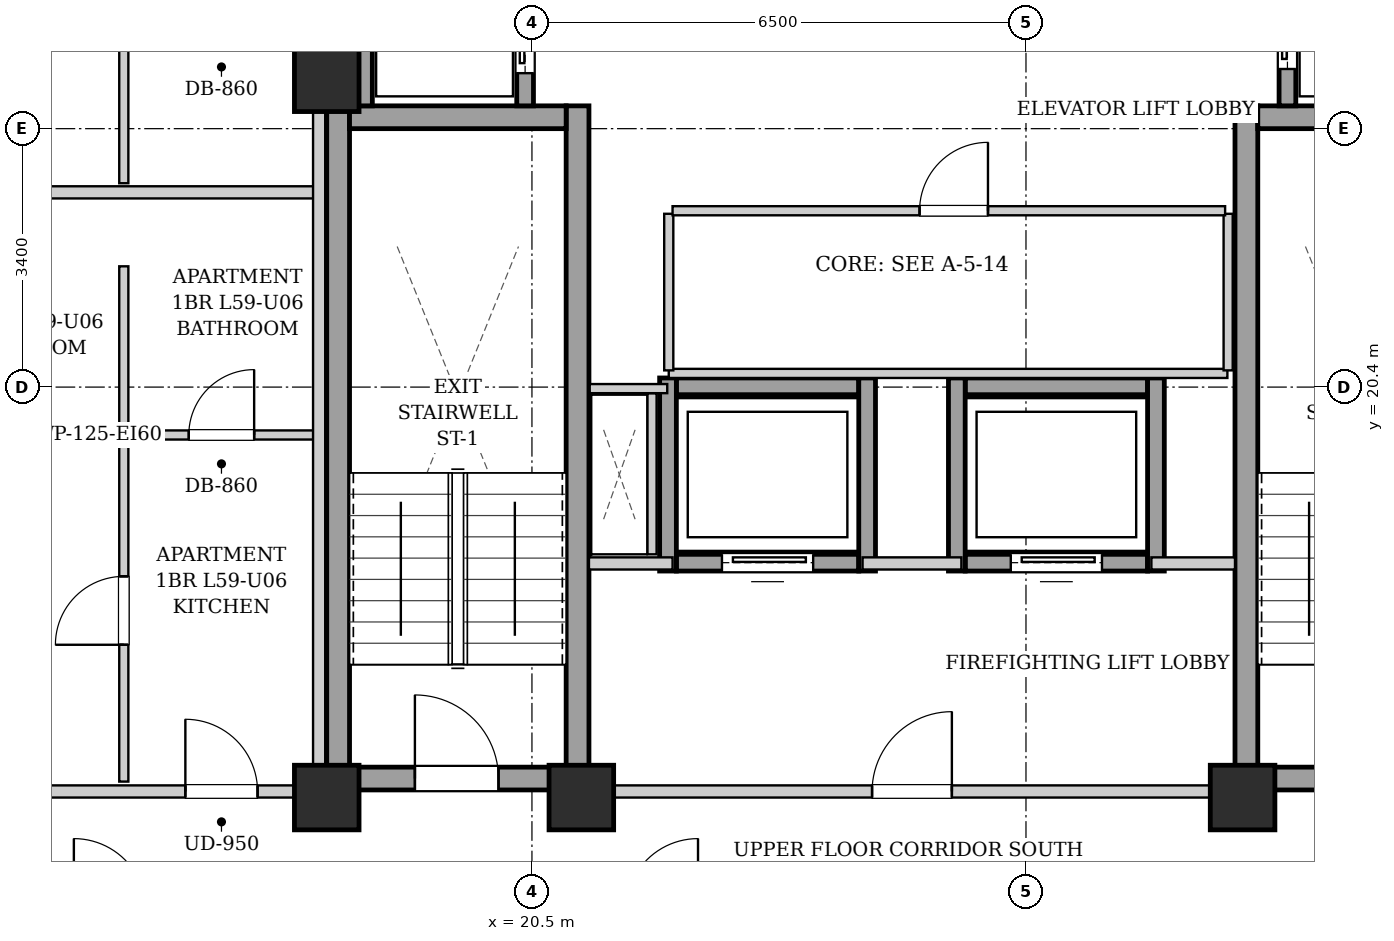
"""IFC4 building model, lengths in metres.
Left out: names, types, materials, properties, quantities, classifications, styles, units other than length and angle.
Written with IfcOpenShell. Run it as: python <this file> out.ifc"""

import sys

from ifc_helpers import new_model, si_unit, direction, frame, frame_2d, origin, origin_2d, place, context, subcontext, project, spatial, rectangle, extrude, element, fill, save


model = new_model("IFC4")
c1 = context("Model", 3, precision=1e-05, world=origin(), true_north=direction((0.0, 1.0)))
c2 = subcontext(c1, "Body", "Model", "MODEL_VIEW")
j1 = project(units=[si_unit("LENGTHUNIT", "METRE"), si_unit("PLANEANGLEUNIT", "RADIAN")], contexts=[c1])
p1 = place(None, origin())
s1 = spatial("IfcSite", under=j1, at=p1, CompositionType="ELEMENT")
p2 = place(p1, origin())
s2 = spatial("IfcBuilding", under=s1, at=p2, CompositionType="ELEMENT")
p3 = place(p2, frame((0.0, 0.0, 204.1)))
s3 = spatial("IfcBuildingStorey", under=s2, at=p3, CompositionType="ELEMENT", Elevation=204.1)
for number, where, z_axis, x_axis in (
    (1, (17.8, 15.0, 0.0), (0.0, 0.0, 1.0), (1.0, 0.0, 0.0)),
    (2, (21.15, 15.0, 0.0), (0.0, 0.0, 1.0), (1.0, 0.0, 0.0)),
    (3, (29.85, 15.0, 0.0), (0.0, 0.0, 1.0), (1.0, 0.0, 0.0)),
    (4, (17.8, 24.45, 0.0), (0.0, 0.0, 1.0), (1.0, 0.0, 0.0)),
):
    element("IfcColumn", number, at=place(p3, frame(where, z_axis=z_axis, x_axis=x_axis)), inside=s3, PredefinedType="COLUMN", context=c2, shape_type="SweptSolid", body=[
        extrude(rectangle(XDim=0.85, YDim=0.85, at=origin_2d()), origin(), (0.0, 0.0, 1.0), 3.3),
    ])
for number, where, z_axis, x_axis in (
    (5, (17.95, 15.1, 0.0), (0.0, 0.0, 1.0), (0.0, 1.0, 0.0)),
    (6, (21.1, 15.1, 0.0), (0.0, 0.0, 1.0), (0.0, 1.0, 0.0)),
):
    element("IfcWall", number, at=place(p3, frame(where, z_axis=z_axis, x_axis=x_axis)), inside=s3, PredefinedType="SHEAR", context=c2, shape_type="SweptSolid", body=[
        extrude(rectangle(XDim=9.0, YDim=0.3, at=frame_2d((4.5, 0.0))), origin(), (0.0, 0.0, 1.0), 3.04),
    ])
p4 = place(p3, frame((18.1, 23.95, 0.0), z_axis=(0.0, 0.0, 1.0), x_axis=(1.0, 0.0, 0.0)))
e7 = element("IfcWall", 7, at=p4, inside=s3, PredefinedType="SHEAR", context=c2, shape_type="SweptSolid", body=[
    extrude(rectangle(XDim=2.85, YDim=0.3, at=frame_2d((1.425, 0.0))), origin(), (0.0, 0.0, 1.0), 3.04),
])
p5 = place(p3, frame((18.1, 15.25, 0.0), z_axis=(0.0, 0.0, 1.0), x_axis=(1.0, 0.0, 0.0)))
e8 = element("IfcWall", 8, at=p5, inside=s3, PredefinedType="SHEAR", context=c2, shape_type="SweptSolid", body=[
    extrude(rectangle(XDim=2.85, YDim=0.3, at=frame_2d((1.425, 0.0))), origin(), (0.0, 0.0, 1.0), 3.04),
])
p6 = place(p5, frame((0.86, 0.0, 0.0)))
e9 = element("IfcOpeningElement", 9, at=p6, cuts=e8, PredefinedType="OPENING", context=c2, shape_type="SweptSolid", body=[
    extrude(rectangle(XDim=1.1, YDim=2.05, at=frame_2d((0.55, 1.025))), frame((0.0, 0.16, 0.0), z_axis=(0.0, -1.0, 0.0), x_axis=(1.0, 0.0, 0.0)), (0.0, 0.0, 1.0), 0.32),
])
p7 = place(p3, frame((29.9, 15.1, 0.0), z_axis=(0.0, 0.0, 1.0), x_axis=(0.0, 1.0, 0.0)))
e10 = element("IfcWall", 10, at=p7, inside=s3, PredefinedType="SHEAR", context=c2, shape_type="SweptSolid", body=[
    extrude(rectangle(XDim=9.0, YDim=0.3, at=frame_2d((4.5, 0.0))), origin(), (0.0, 0.0, 1.0), 3.04),
])
p8 = place(p3, frame((30.05, 23.95, 0.0), z_axis=(0.0, 0.0, 1.0), x_axis=(1.0, 0.0, 0.0)))
e11 = element("IfcWall", 11, at=p8, inside=s3, PredefinedType="SHEAR", context=c2, shape_type="SweptSolid", body=[
    extrude(rectangle(XDim=2.85, YDim=0.3, at=frame_2d((1.425, 0.0))), origin(), (0.0, 0.0, 1.0), 3.04),
])
p9 = place(p3, frame((30.05, 15.25, 0.0), z_axis=(0.0, 0.0, 1.0), x_axis=(1.0, 0.0, 0.0)))
e12 = element("IfcWall", 12, at=p9, inside=s3, PredefinedType="SHEAR", context=c2, shape_type="SweptSolid", body=[
    extrude(rectangle(XDim=2.85, YDim=0.3, at=frame_2d((1.425, 0.0))), origin(), (0.0, 0.0, 1.0), 3.04),
])
p10 = place(p9, frame((0.86, 0.0, 0.0)))
e13 = element("IfcOpeningElement", 13, at=p10, cuts=e12, PredefinedType="OPENING", context=c2, shape_type="SweptSolid", body=[
    extrude(rectangle(XDim=1.1, YDim=2.05, at=frame_2d((0.55, 1.025))), frame((0.0, 0.16, 0.0), z_axis=(0.0, -1.0, 0.0), x_axis=(1.0, 0.0, 0.0)), (0.0, 0.0, 1.0), 0.32),
])
p11 = place(p3, frame((18.29, 24.1, 0.0), z_axis=(0.0, 0.0, 1.0), x_axis=(0.0, 1.0, 0.0)))
e14 = element("IfcWall", 14, at=p11, inside=s3, PredefinedType="SHEAR", context=c2, shape_type="SweptSolid", body=[
    extrude(rectangle(XDim=4.14, YDim=0.22, at=frame_2d((2.07, 0.0))), origin(), (0.0, 0.0, 1.0), 3.04),
])
p12 = place(p3, frame((20.41, 24.1, 0.0), z_axis=(0.0, 0.0, 1.0), x_axis=(0.0, 1.0, 0.0)))
e15 = element("IfcWall", 15, at=p12, inside=s3, PredefinedType="SHEAR", context=c2, shape_type="SweptSolid", body=[
    extrude(rectangle(XDim=1.96, YDim=0.22, at=frame_2d((0.98, 0.0))), origin(), (0.0, 0.0, 1.0), 3.04),
])
p13 = place(p12, frame((0.43, 0.0, 0.0)))
e16 = element("IfcOpeningElement", 16, at=p13, cuts=e15, PredefinedType="OPENING", context=c2, shape_type="SweptSolid", body=[
    extrude(rectangle(XDim=1.1, YDim=2.15, at=frame_2d((0.55, 1.075))), frame((0.0, 0.12, 0.0), z_axis=(0.0, -1.0, 0.0), x_axis=(1.0, 0.0, 0.0)), (0.0, 0.0, 1.0), 0.24),
])
p14 = place(p3, frame((30.44, 24.1, 0.0), z_axis=(0.0, 0.0, 1.0), x_axis=(0.0, 1.0, 0.0)))
e17 = element("IfcWall", 17, at=p14, inside=s3, PredefinedType="SHEAR", context=c2, shape_type="SweptSolid", body=[
    extrude(rectangle(XDim=2.07, YDim=0.22, at=frame_2d((1.035, 0.0))), origin(), (0.0, 0.0, 1.0), 3.04),
])
p15 = place(p14, frame((0.485, 0.0, 0.0)))
e18 = element("IfcOpeningElement", 18, at=p15, cuts=e17, PredefinedType="OPENING", context=c2, shape_type="SweptSolid", body=[
    extrude(rectangle(XDim=1.1, YDim=2.15, at=frame_2d((0.55, 1.075))), frame((0.0, 0.12, 0.0), z_axis=(0.0, -1.0, 0.0), x_axis=(1.0, 0.0, 0.0)), (0.0, 0.0, 1.0), 0.24),
])
p16 = place(p3, frame((22.4, 18.09, 0.0), z_axis=(0.0, 0.0, 1.0), x_axis=(1.0, 0.0, 0.0)))
e19 = element("IfcWall", 19, at=p16, inside=s3, PredefinedType="SHEAR", context=c2, shape_type="SweptSolid", body=[
    extrude(rectangle(XDim=2.4, YDim=0.22, at=frame_2d((1.2, 0.0))), origin(), (0.0, 0.0, 1.0), 3.04),
])
p17 = place(p16, frame((0.6, 0.0, 0.0)))
e20 = element("IfcOpeningElement", 20, at=p17, cuts=e19, PredefinedType="OPENING", context=c2, shape_type="SweptSolid", body=[
    extrude(rectangle(XDim=1.2, YDim=2.15, at=frame_2d((0.6, 1.075))), frame((0.0, 0.12, 0.0), z_axis=(0.0, -1.0, 0.0), x_axis=(1.0, 0.0, 0.0)), (0.0, 0.0, 1.0), 0.24),
])
p18 = place(p3, frame((22.4, 20.41, 0.0), z_axis=(0.0, 0.0, 1.0), x_axis=(1.0, 0.0, 0.0)))
e21 = element("IfcWall", 21, at=p18, inside=s3, PredefinedType="SHEAR", context=c2, shape_type="SweptSolid", body=[
    extrude(rectangle(XDim=2.4, YDim=0.22, at=frame_2d((1.2, 0.0))), origin(), (0.0, 0.0, 1.0), 3.04),
])
for number, where, z_axis, x_axis in (
    (22, (22.29, 17.98, 0.0), (0.0, 0.0, 1.0), (0.0, 1.0, 0.0)),
    (23, (24.91, 17.98, 0.0), (0.0, 0.0, 1.0), (0.0, 1.0, 0.0)),
):
    element("IfcWall", number, at=place(p3, frame(where, z_axis=z_axis, x_axis=x_axis)), inside=s3, PredefinedType="SHEAR", context=c2, shape_type="SweptSolid", body=[
        extrude(rectangle(XDim=2.54, YDim=0.22, at=frame_2d((1.27, 0.0))), origin(), (0.0, 0.0, 1.0), 3.04),
    ])
p19 = place(p3, frame((26.2, 18.09, 0.0), z_axis=(0.0, 0.0, 1.0), x_axis=(1.0, 0.0, 0.0)))
e24 = element("IfcWall", 24, at=p19, inside=s3, PredefinedType="SHEAR", context=c2, shape_type="SweptSolid", body=[
    extrude(rectangle(XDim=2.4, YDim=0.22, at=frame_2d((1.2, 0.0))), origin(), (0.0, 0.0, 1.0), 3.04),
])
p20 = place(p19, frame((0.6, 0.0, 0.0)))
e25 = element("IfcOpeningElement", 25, at=p20, cuts=e24, PredefinedType="OPENING", context=c2, shape_type="SweptSolid", body=[
    extrude(rectangle(XDim=1.2, YDim=2.15, at=frame_2d((0.6, 1.075))), frame((0.0, 0.12, 0.0), z_axis=(0.0, -1.0, 0.0), x_axis=(1.0, 0.0, 0.0)), (0.0, 0.0, 1.0), 0.24),
])
p21 = place(p3, frame((26.2, 20.41, 0.0), z_axis=(0.0, 0.0, 1.0), x_axis=(1.0, 0.0, 0.0)))
e26 = element("IfcWall", 26, at=p21, inside=s3, PredefinedType="SHEAR", context=c2, shape_type="SweptSolid", body=[
    extrude(rectangle(XDim=2.4, YDim=0.22, at=frame_2d((1.2, 0.0))), origin(), (0.0, 0.0, 1.0), 3.04),
])
for number, where, z_axis, x_axis in (
    (27, (26.09, 17.98, 0.0), (0.0, 0.0, 1.0), (0.0, 1.0, 0.0)),
    (28, (28.71, 17.98, 0.0), (0.0, 0.0, 1.0), (0.0, 1.0, 0.0)),
):
    element("IfcWall", number, at=place(p3, frame(where, z_axis=z_axis, x_axis=x_axis)), inside=s3, PredefinedType="SHEAR", context=c2, shape_type="SweptSolid", body=[
        extrude(rectangle(XDim=2.54, YDim=0.22, at=frame_2d((1.27, 0.0))), origin(), (0.0, 0.0, 1.0), 3.04),
    ])
p22 = place(p3, frame((21.25, 15.08, 0.0), z_axis=(0.0, 0.0, 1.0), x_axis=(1.0, 0.0, 0.0)))
e29 = element("IfcWall", 29, at=p22, inside=s3, PredefinedType="PARTITIONING", context=c2, shape_type="SweptSolid", body=[
    extrude(rectangle(XDim=8.5, YDim=0.16, at=frame_2d((4.25, 0.0))), origin(), (0.0, 0.0, 1.0), 2.556),
])
p23 = place(p22, frame((3.725, 0.0, 0.0)))
e30 = element("IfcOpeningElement", 30, at=p23, cuts=e29, PredefinedType="OPENING", context=c2, shape_type="SweptSolid", body=[
    extrude(rectangle(XDim=1.05, YDim=2.05, at=frame_2d((0.525, 1.025))), frame((0.0, 0.09, 0.0), z_axis=(0.0, -1.0, 0.0), x_axis=(1.0, 0.0, 0.0)), (0.0, 0.0, 1.0), 0.18),
])
p24 = place(p3, frame((21.25, 18.08, 0.0), z_axis=(0.0, 0.0, 1.0), x_axis=(1.0, 0.0, 0.0)))
e31 = element("IfcWall", 31, at=p24, inside=s3, PredefinedType="PARTITIONING", context=c2, shape_type="SweptSolid", body=[
    extrude(rectangle(XDim=1.1, YDim=0.16, at=frame_2d((0.55, 0.0))), origin(), (0.0, 0.0, 1.0), 3.04),
])
p25 = place(p3, frame((24.85, 18.08, 0.0), z_axis=(0.0, 0.0, 1.0), x_axis=(1.0, 0.0, 0.0)))
e32 = element("IfcWall", 32, at=p25, inside=s3, PredefinedType="PARTITIONING", context=c2, shape_type="SweptSolid", body=[
    extrude(rectangle(XDim=1.3, YDim=0.16, at=frame_2d((0.65, 0.0))), origin(), (0.0, 0.0, 1.0), 3.04),
])
p26 = place(p3, frame((28.65, 18.08, 0.0), z_axis=(0.0, 0.0, 1.0), x_axis=(1.0, 0.0, 0.0)))
e33 = element("IfcWall", 33, at=p26, inside=s3, PredefinedType="PARTITIONING", context=c2, shape_type="SweptSolid", body=[
    extrude(rectangle(XDim=1.1, YDim=0.16, at=frame_2d((0.55, 0.0))), origin(), (0.0, 0.0, 1.0), 3.04),
])
p27 = place(p3, frame((17.88, 24.12, 0.0), z_axis=(0.0, 0.0, 1.0), x_axis=(0.0, 1.0, 0.0)))
e34 = element("IfcWall", 34, at=p27, inside=s3, PredefinedType="PARTITIONING", context=c2, shape_type="SweptSolid", body=[
    extrude(rectangle(XDim=4.76, YDim=0.16, at=frame_2d((2.38, 0.0))), origin(), (0.0, 0.0, 1.0), 3.04),
])
p28 = place(p3, frame((22.08, 18.2, 0.0), z_axis=(0.0, 0.0, 1.0), x_axis=(0.0, 1.0, 0.0)))
e35 = element("IfcWall", 35, at=p28, inside=s3, PredefinedType="PARTITIONING", context=c2, shape_type="SweptSolid", body=[
    extrude(rectangle(XDim=2.12, YDim=0.12, at=frame_2d((1.06, 0.0))), origin(), (0.0, 0.0, 1.0), 3.04),
])
p29 = place(p3, frame((22.28, 20.38, 0.0), z_axis=(0.0, 0.0, 1.0), x_axis=(-1.0, 0.0, 0.0)))
e36 = element("IfcWall", 36, at=p29, inside=s3, PredefinedType="PARTITIONING", context=c2, shape_type="SweptSolid", body=[
    extrude(rectangle(XDim=1.02, YDim=0.12, at=frame_2d((0.51, 0.0))), origin(), (0.0, 0.0, 1.0), 3.04),
])
p30 = place(p3, frame((22.3, 20.58, 0.0), z_axis=(0.0, 0.0, 1.0), x_axis=(1.0, 0.0, 0.0)))
e37 = element("IfcWall", 37, at=p30, inside=s3, PredefinedType="PARTITIONING", context=c2, shape_type="SweptSolid", body=[
    extrude(rectangle(XDim=7.35, YDim=0.12, at=frame_2d((3.675, 0.0))), origin(), (0.0, 0.0, 1.0), 3.04),
])
for number, where, z_axis, x_axis in (
    (38, (22.3, 20.62, 0.0), (0.0, 0.0, 1.0), (0.0, 1.0, 0.0)),
    (39, (29.66, 20.62, 0.0), (0.0, 0.0, 1.0), (0.0, 1.0, 0.0)),
):
    element("IfcWall", number, at=place(p3, frame(where, z_axis=z_axis, x_axis=x_axis)), inside=s3, PredefinedType="PARTITIONING", context=c2, shape_type="SweptSolid", body=[
        extrude(rectangle(XDim=2.06, YDim=0.12, at=frame_2d((1.03, 0.0))), origin(), (0.0, 0.0, 1.0), 3.04),
    ])
p31 = place(p3, frame((22.35, 22.72, 0.0), z_axis=(0.0, 0.0, 1.0), x_axis=(1.0, 0.0, 0.0)))
e40 = element("IfcWall", 40, at=p31, inside=s3, PredefinedType="PARTITIONING", context=c2, shape_type="SweptSolid", body=[
    extrude(rectangle(XDim=7.27, YDim=0.12, at=frame_2d((3.635, 0.0))), origin(), (0.0, 0.0, 1.0), 3.04),
])
p32 = place(p31, frame((3.25, 0.0, 0.0)))
e41 = element("IfcOpeningElement", 41, at=p32, cuts=e40, PredefinedType="OPENING", context=c2, shape_type="SweptSolid", body=[
    extrude(rectangle(XDim=0.9, YDim=2.05, at=frame_2d((0.45, 1.025))), frame((0.0, 0.07, 0.0), z_axis=(0.0, -1.0, 0.0), x_axis=(1.0, 0.0, 0.0)), (0.0, 0.0, 1.0), 0.14),
])
p33 = place(p3, frame((10.88, 15.08, 0.0), z_axis=(0.0, 0.0, 1.0), x_axis=(1.0, 0.0, 0.0)))
e42 = element("IfcWall", 42, at=p33, inside=s3, PredefinedType="PARTITIONING", context=c2, shape_type="SweptSolid", body=[
    extrude(rectangle(XDim=6.88, YDim=0.16, at=frame_2d((3.44, 0.0))), origin(), (0.0, 0.0, 1.0), 2.556),
])
p34 = place(p33, frame((5.06, 0.0, 0.0)))
e43 = element("IfcOpeningElement", 43, at=p34, cuts=e42, PredefinedType="OPENING", context=c2, shape_type="SweptSolid", body=[
    extrude(rectangle(XDim=0.95, YDim=2.1, at=frame_2d((0.475, 1.05))), frame((0.0, 0.09, 0.0), z_axis=(0.0, -1.0, 0.0), x_axis=(1.0, 0.0, 0.0)), (0.0, 0.0, 1.0), 0.18),
])
p35 = place(p3, frame((10.88, 22.962, 0.0), z_axis=(0.0, 0.0, 1.0), x_axis=(1.0, 0.0, 0.0)))
e44 = element("IfcWall", 44, at=p35, inside=s3, PredefinedType="PARTITIONING", context=c2, shape_type="SweptSolid", body=[
    extrude(rectangle(XDim=6.76, YDim=0.16, at=frame_2d((3.38, 0.0))), origin(), (0.0, 0.0, 1.0), 3.04),
])
p36 = place(p3, frame((15.19, 19.77, 0.0), z_axis=(0.0, 0.0, 1.0), x_axis=(1.0, 0.0, 0.0)))
e45 = element("IfcWall", 45, at=p36, inside=s3, PredefinedType="PARTITIONING", context=c2, shape_type="SweptSolid", body=[
    extrude(rectangle(XDim=2.45, YDim=0.12, at=frame_2d((1.225, 0.0))), origin(), (0.0, 0.0, 1.0), 3.04),
])
p37 = place(p36, frame((0.795, 0.0, 0.0)))
e46 = element("IfcOpeningElement", 46, at=p37, cuts=e45, PredefinedType="OPENING", context=c2, shape_type="SweptSolid", body=[
    extrude(rectangle(XDim=0.86, YDim=2.05, at=frame_2d((0.43, 1.025))), frame((0.0, 0.07, 0.0), z_axis=(0.0, -1.0, 0.0), x_axis=(1.0, 0.0, 0.0)), (0.0, 0.0, 1.0), 0.14),
])
p38 = place(p3, frame((15.13, 19.83, 0.0), z_axis=(0.0, 0.0, 1.0), x_axis=(0.0, 1.0, 0.0)))
e47 = element("IfcWall", 47, at=p38, inside=s3, PredefinedType="PARTITIONING", context=c2, shape_type="SweptSolid", body=[
    extrude(rectangle(XDim=2.159, YDim=0.12, at=frame_2d((1.08, 0.0))), origin(), (0.0, 0.0, 1.0), 3.04),
])
p39 = place(p3, frame((15.13, 15.21, 0.0), z_axis=(0.0, 0.0, 1.0), x_axis=(0.0, 1.0, 0.0)))
e48 = element("IfcWall", 48, at=p39, inside=s3, PredefinedType="PARTITIONING", context=c2, shape_type="SweptSolid", body=[
    extrude(rectangle(XDim=4.5, YDim=0.12, at=frame_2d((2.25, 0.0))), origin(), (0.0, 0.0, 1.0), 3.04),
])
p40 = place(p39, frame((1.8, 0.0, 0.0)))
e49 = element("IfcOpeningElement", 49, at=p40, cuts=e48, PredefinedType="OPENING", context=c2, shape_type="SweptSolid", body=[
    extrude(rectangle(XDim=0.9, YDim=2.05, at=frame_2d((0.45, 1.025))), frame((0.0, 0.07, 0.0), z_axis=(0.0, -1.0, 0.0), x_axis=(1.0, 0.0, 0.0)), (0.0, 0.0, 1.0), 0.14),
])
p41 = place(p3, frame((15.13, 23.082, 0.0), z_axis=(0.0, 0.0, 1.0), x_axis=(0.0, 1.0, 0.0)))
e50 = element("IfcWall", 50, at=p41, inside=s3, PredefinedType="PARTITIONING", context=c2, shape_type="SweptSolid", body=[
    extrude(rectangle(XDim=1.85, YDim=0.12, at=frame_2d((0.925, 0.0))), origin(), (0.0, 0.0, 1.0), 3.04),
])
p42 = place(p3, frame((17.7, 15.02, 0.0), z_axis=(0.0, 0.0, 1.0), x_axis=(0.0, 1.0, 0.0)))
e51 = element("IfcWall", 51, at=p42, inside=s3, PredefinedType="PARTITIONING", context=c2, shape_type="SweptSolid", body=[
    extrude(rectangle(XDim=13.98, YDim=0.16, at=frame_2d((6.99, 0.0))), origin(), (0.0, 0.0, 1.0), 3.04),
])
p43 = place(p6, origin())
e52 = element("IfcDoor", 52, at=p43, inside=s3, OperationType="SINGLE_SWING_LEFT", PredefinedType="DOOR", context=c2, shape_type="SweptSolid", body=[
    extrude(rectangle(XDim=1.1, YDim=2.05, at=frame_2d((0.55, 1.025))), frame((0.0, 0.025, 0.0), z_axis=(0.0, -1.0, 0.0), x_axis=(1.0, 0.0, 0.0)), (0.0, 0.0, 1.0), 0.05),
])
fill(e9, e52)
p44 = place(p13, origin())
e53 = element("IfcDoor", 53, at=p44, inside=s3, OperationType="SLIDING_TO_LEFT", PredefinedType="DOOR", context=c2, shape_type="SweptSolid", body=[
    extrude(rectangle(XDim=1.1, YDim=2.15, at=frame_2d((0.55, 1.075))), frame((0.0, 0.025, 0.0), z_axis=(0.0, -1.0, 0.0), x_axis=(1.0, 0.0, 0.0)), (0.0, 0.0, 1.0), 0.05),
])
fill(e16, e53)
p45 = place(p15, origin())
e54 = element("IfcDoor", 54, at=p45, inside=s3, OperationType="SLIDING_TO_LEFT", PredefinedType="DOOR", context=c2, shape_type="SweptSolid", body=[
    extrude(rectangle(XDim=1.1, YDim=2.15, at=frame_2d((0.55, 1.075))), frame((0.0, 0.025, 0.0), z_axis=(0.0, -1.0, 0.0), x_axis=(1.0, 0.0, 0.0)), (0.0, 0.0, 1.0), 0.05),
])
fill(e18, e54)
p46 = place(p17, origin())
e55 = element("IfcDoor", 55, at=p46, inside=s3, OperationType="SLIDING_TO_LEFT", PredefinedType="DOOR", context=c2, shape_type="SweptSolid", body=[
    extrude(rectangle(XDim=1.2, YDim=2.15, at=frame_2d((0.6, 1.075))), frame((0.0, 0.025, 0.0), z_axis=(0.0, -1.0, 0.0), x_axis=(1.0, 0.0, 0.0)), (0.0, 0.0, 1.0), 0.05),
])
fill(e20, e55)
p47 = place(p20, origin())
e56 = element("IfcDoor", 56, at=p47, inside=s3, OperationType="SLIDING_TO_LEFT", PredefinedType="DOOR", context=c2, shape_type="SweptSolid", body=[
    extrude(rectangle(XDim=1.2, YDim=2.15, at=frame_2d((0.6, 1.075))), frame((0.0, 0.025, 0.0), z_axis=(0.0, -1.0, 0.0), x_axis=(1.0, 0.0, 0.0)), (0.0, 0.0, 1.0), 0.05),
])
fill(e25, e56)
p48 = place(p23, origin())
e57 = element("IfcDoor", 57, at=p48, inside=s3, OperationType="SINGLE_SWING_RIGHT", PredefinedType="DOOR", context=c2, shape_type="SweptSolid", body=[
    extrude(rectangle(XDim=1.05, YDim=2.05, at=frame_2d((0.525, 1.025))), frame((0.0, 0.025, 0.0), z_axis=(0.0, -1.0, 0.0), x_axis=(1.0, 0.0, 0.0)), (0.0, 0.0, 1.0), 0.05),
])
fill(e30, e57)
p49 = place(p32, origin())
e58 = element("IfcDoor", 58, at=p49, inside=s3, OperationType="SINGLE_SWING_RIGHT", PredefinedType="DOOR", context=c2, shape_type="SweptSolid", body=[
    extrude(rectangle(XDim=0.9, YDim=2.05, at=frame_2d((0.45, 1.025))), frame((0.0, 0.025, 0.0), z_axis=(0.0, -1.0, 0.0), x_axis=(1.0, 0.0, 0.0)), (0.0, 0.0, 1.0), 0.05),
])
fill(e41, e58)
p50 = place(p34, origin())
e59 = element("IfcDoor", 59, at=p50, inside=s3, OperationType="SINGLE_SWING_LEFT", PredefinedType="DOOR", context=c2, shape_type="SweptSolid", body=[
    extrude(rectangle(XDim=0.95, YDim=2.1, at=frame_2d((0.475, 1.05))), frame((0.0, 0.025, 0.0), z_axis=(0.0, -1.0, 0.0), x_axis=(1.0, 0.0, 0.0)), (0.0, 0.0, 1.0), 0.05),
])
fill(e43, e59)
p51 = place(p37, origin())
e60 = element("IfcDoor", 60, at=p51, inside=s3, OperationType="SINGLE_SWING_RIGHT", PredefinedType="DOOR", context=c2, shape_type="SweptSolid", body=[
    extrude(rectangle(XDim=0.86, YDim=2.05, at=frame_2d((0.43, 1.025))), frame((0.0, 0.025, 0.0), z_axis=(0.0, -1.0, 0.0), x_axis=(1.0, 0.0, 0.0)), (0.0, 0.0, 1.0), 0.05),
])
fill(e46, e60)
p52 = place(p40, origin())
e61 = element("IfcDoor", 61, at=p52, inside=s3, OperationType="SINGLE_SWING_LEFT", PredefinedType="DOOR", context=c2, shape_type="SweptSolid", body=[
    extrude(rectangle(XDim=0.9, YDim=2.05, at=frame_2d((0.45, 1.025))), frame((0.0, 0.025, 0.0), z_axis=(0.0, -1.0, 0.0), x_axis=(1.0, 0.0, 0.0)), (0.0, 0.0, 1.0), 0.05),
])
fill(e49, e61)
save(model, sys.argv[1])
